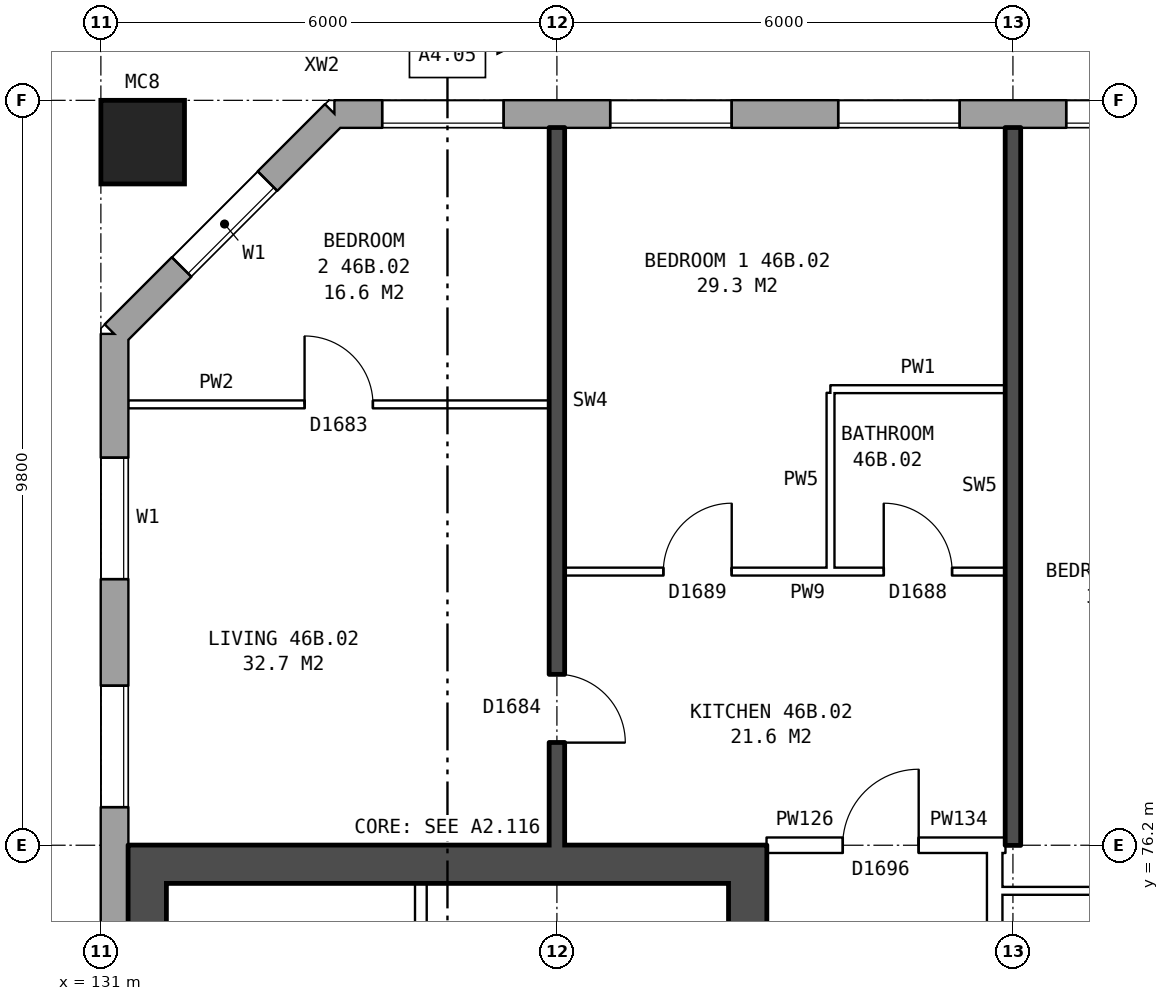
"""IFC4 building model, lengths in metres.
Left out: names, types, materials, properties, quantities, classifications, styles, units other than length and angle.
Written with IfcOpenShell. Run it as: python <this file> out.ifc"""

import sys

from ifc_helpers import new_model, si_unit, direction, frame, frame_2d, origin, origin_2d, place, context, subcontext, project, spatial, rectangle, hollow_rectangle, extrude, element, fill, save


model = new_model("IFC4")
c1 = context("Model", 3, precision=1e-05, world=origin(), true_north=direction((0.0, 1.0)))
c2 = subcontext(c1, "Body", "Model", "MODEL_VIEW")
j1 = project(units=[si_unit("LENGTHUNIT", "METRE"), si_unit("PLANEANGLEUNIT", "RADIAN")], contexts=[c1])
p1 = place(None, origin())
s1 = spatial("IfcSite", under=j1, at=p1, CompositionType="ELEMENT")
p2 = place(p1, origin())
s2 = spatial("IfcBuilding", under=s1, at=p2, CompositionType="ELEMENT")
p3 = place(p2, frame((0.0, 0.0, 164.0)))
s3 = spatial("IfcBuildingStorey", under=s2, at=p3, CompositionType="ELEMENT", Elevation=164.0)
p4 = place(p3, frame((131.55, 85.45, 0.0), z_axis=(0.0, 0.0, 1.0), x_axis=(1.0, 0.0, 0.0)))
e1 = element("IfcColumn", 1, at=p4, inside=s3, PredefinedType="COLUMN", context=c2, shape_type="SweptSolid", body=[
    extrude(hollow_rectangle(XDim=1.1, YDim=1.1, WallThickness=0.06, at=origin_2d()), origin(), (0.0, 0.0, 1.0), 3.1),
])
p5 = place(p3, frame((168.425, 85.82, 0.0), z_axis=(0.0, 0.0, 1.0), x_axis=(-1.0, 0.0, 0.0)))
e2 = element("IfcWall", 2, at=p5, inside=s3, PredefinedType="STANDARD", context=c2, shape_type="SweptSolid", body=[
    extrude(rectangle(XDim=34.351, YDim=0.36, at=frame_2d((17.175, 0.0))), origin(), (0.0, 0.0, 1.0), 2.85),
])
p6 = place(p5, frame((2.125, 0.0, 0.8)))
e3 = element("IfcOpeningElement", 3, at=p6, cuts=e2, PredefinedType="OPENING", context=c2, shape_type="SweptSolid", body=[
    extrude(rectangle(XDim=1.6, YDim=1.8, at=frame_2d((0.8, 0.9))), frame((0.0, 0.19, 0.0), z_axis=(0.0, -1.0, 0.0), x_axis=(1.0, 0.0, 0.0)), (0.0, 0.0, 1.0), 0.38),
])
p7 = place(p5, frame((5.125, 0.0, 0.8)))
e4 = element("IfcOpeningElement", 4, at=p7, cuts=e2, PredefinedType="OPENING", context=c2, shape_type="SweptSolid", body=[
    extrude(rectangle(XDim=1.6, YDim=1.8, at=frame_2d((0.8, 0.9))), frame((0.0, 0.19, 0.0), z_axis=(0.0, -1.0, 0.0), x_axis=(1.0, 0.0, 0.0)), (0.0, 0.0, 1.0), 0.38),
])
p8 = place(p5, frame((8.125, 0.0, 0.8)))
e5 = element("IfcOpeningElement", 5, at=p8, cuts=e2, PredefinedType="OPENING", context=c2, shape_type="SweptSolid", body=[
    extrude(rectangle(XDim=1.6, YDim=1.8, at=frame_2d((0.8, 0.9))), frame((0.0, 0.19, 0.0), z_axis=(0.0, -1.0, 0.0), x_axis=(1.0, 0.0, 0.0)), (0.0, 0.0, 1.0), 0.38),
])
p9 = place(p5, frame((11.125, 0.0, 0.8)))
e6 = element("IfcOpeningElement", 6, at=p9, cuts=e2, PredefinedType="OPENING", context=c2, shape_type="SweptSolid", body=[
    extrude(rectangle(XDim=1.6, YDim=1.8, at=frame_2d((0.8, 0.9))), frame((0.0, 0.19, 0.0), z_axis=(0.0, -1.0, 0.0), x_axis=(1.0, 0.0, 0.0)), (0.0, 0.0, 1.0), 0.38),
])
p10 = place(p5, frame((13.625, 0.0, 0.9)))
e7 = element("IfcOpeningElement", 7, at=p10, cuts=e2, PredefinedType="OPENING", context=c2, shape_type="SweptSolid", body=[
    extrude(rectangle(XDim=1.0, YDim=1.5, at=frame_2d((0.5, 0.75))), frame((0.0, 0.19, 0.0), z_axis=(0.0, -1.0, 0.0), x_axis=(1.0, 0.0, 0.0)), (0.0, 0.0, 1.0), 0.38),
])
p11 = place(p5, frame((16.575, 0.0, 0.25)))
e8 = element("IfcOpeningElement", 8, at=p11, cuts=e2, PredefinedType="OPENING", context=c2, shape_type="SweptSolid", body=[
    extrude(rectangle(XDim=1.4, YDim=1.2, at=frame_2d((0.7, 0.6))), frame((0.0, 0.19, 0.0), z_axis=(0.0, -1.0, 0.0), x_axis=(1.0, 0.0, 0.0)), (0.0, 0.0, 1.0), 0.38),
])
p12 = place(p5, frame((20.125, 0.0, 0.8)))
e9 = element("IfcOpeningElement", 9, at=p12, cuts=e2, PredefinedType="OPENING", context=c2, shape_type="SweptSolid", body=[
    extrude(rectangle(XDim=1.6, YDim=1.8, at=frame_2d((0.8, 0.9))), frame((0.0, 0.19, 0.0), z_axis=(0.0, -1.0, 0.0), x_axis=(1.0, 0.0, 0.0)), (0.0, 0.0, 1.0), 0.38),
])
p13 = place(p5, frame((23.125, 0.0, 0.8)))
e10 = element("IfcOpeningElement", 10, at=p13, cuts=e2, PredefinedType="OPENING", context=c2, shape_type="SweptSolid", body=[
    extrude(rectangle(XDim=1.6, YDim=1.8, at=frame_2d((0.8, 0.9))), frame((0.0, 0.19, 0.0), z_axis=(0.0, -1.0, 0.0), x_axis=(1.0, 0.0, 0.0)), (0.0, 0.0, 1.0), 0.38),
])
p14 = place(p5, frame((26.125, 0.0, 0.8)))
e11 = element("IfcOpeningElement", 11, at=p14, cuts=e2, PredefinedType="OPENING", context=c2, shape_type="SweptSolid", body=[
    extrude(rectangle(XDim=1.6, YDim=1.8, at=frame_2d((0.8, 0.9))), frame((0.0, 0.19, 0.0), z_axis=(0.0, -1.0, 0.0), x_axis=(1.0, 0.0, 0.0)), (0.0, 0.0, 1.0), 0.38),
])
p15 = place(p5, frame((29.125, 0.0, 0.8)))
e12 = element("IfcOpeningElement", 12, at=p15, cuts=e2, PredefinedType="OPENING", context=c2, shape_type="SweptSolid", body=[
    extrude(rectangle(XDim=1.6, YDim=1.8, at=frame_2d((0.8, 0.9))), frame((0.0, 0.19, 0.0), z_axis=(0.0, -1.0, 0.0), x_axis=(1.0, 0.0, 0.0)), (0.0, 0.0, 1.0), 0.38),
])
p16 = place(p5, frame((32.125, 0.0, 0.8)))
e13 = element("IfcOpeningElement", 13, at=p16, cuts=e2, PredefinedType="OPENING", context=c2, shape_type="SweptSolid", body=[
    extrude(rectangle(XDim=1.6, YDim=1.8, at=frame_2d((0.8, 0.9))), frame((0.0, 0.19, 0.0), z_axis=(0.0, -1.0, 0.0), x_axis=(1.0, 0.0, 0.0)), (0.0, 0.0, 1.0), 0.38),
])
p17 = place(p5, frame((14.925, 0.0, 1.7)))
e14 = element("IfcOpeningElement", 14, at=p17, cuts=e2, PredefinedType="OPENING", context=c2, shape_type="SweptSolid", body=[
    extrude(rectangle(XDim=0.6, YDim=0.9, at=frame_2d((0.3, 0.45))), frame((0.0, 0.19, 0.0), z_axis=(0.0, -1.0, 0.0), x_axis=(1.0, 0.0, 0.0)), (0.0, 0.0, 1.0), 0.38),
])
p18 = place(p3, frame((134.075, 85.82, 0.0), z_axis=(0.0, 0.0, 1.0), x_axis=(-0.707106781187, -0.707106781187, 0.0)))
e15 = element("IfcWall", 15, at=p18, inside=s3, PredefinedType="STANDARD", context=c2, shape_type="SweptSolid", body=[
    extrude(rectangle(XDim=4.094, YDim=0.36, at=frame_2d((2.047, 0.0))), origin(), (0.0, 0.0, 1.0), 2.85),
])
p19 = place(p18, frame((1.247, 0.0, 0.8)))
e16 = element("IfcOpeningElement", 16, at=p19, cuts=e15, PredefinedType="OPENING", context=c2, shape_type="SweptSolid", body=[
    extrude(rectangle(XDim=1.6, YDim=1.8, at=frame_2d((0.8, 0.9))), frame((0.0, 0.19, 0.0), z_axis=(0.0, -1.0, 0.0), x_axis=(1.0, 0.0, 0.0)), (0.0, 0.0, 1.0), 0.38),
])
p20 = place(p3, frame((131.18, 82.925, 0.0), z_axis=(0.0, 0.0, 1.0), x_axis=(0.0, -1.0, 0.0)))
e17 = element("IfcWall", 17, at=p20, inside=s3, PredefinedType="STANDARD", context=c2, shape_type="SweptSolid", body=[
    extrude(rectangle(XDim=25.851, YDim=0.36, at=frame_2d((12.925, 0.0))), origin(), (0.0, 0.0, 1.0), 2.85),
])
p21 = place(p20, frame((1.625, 0.0, 0.8)))
e18 = element("IfcOpeningElement", 18, at=p21, cuts=e17, PredefinedType="OPENING", context=c2, shape_type="SweptSolid", body=[
    extrude(rectangle(XDim=1.6, YDim=1.8, at=frame_2d((0.8, 0.9))), frame((0.0, 0.19, 0.0), z_axis=(0.0, -1.0, 0.0), x_axis=(1.0, 0.0, 0.0)), (0.0, 0.0, 1.0), 0.38),
])
p22 = place(p20, frame((4.625, 0.0, 0.8)))
e19 = element("IfcOpeningElement", 19, at=p22, cuts=e17, PredefinedType="OPENING", context=c2, shape_type="SweptSolid", body=[
    extrude(rectangle(XDim=1.6, YDim=1.8, at=frame_2d((0.8, 0.9))), frame((0.0, 0.19, 0.0), z_axis=(0.0, -1.0, 0.0), x_axis=(1.0, 0.0, 0.0)), (0.0, 0.0, 1.0), 0.38),
])
p23 = place(p20, frame((19.625, 0.0, 0.8)))
e20 = element("IfcOpeningElement", 20, at=p23, cuts=e17, PredefinedType="OPENING", context=c2, shape_type="SweptSolid", body=[
    extrude(rectangle(XDim=1.6, YDim=1.8, at=frame_2d((0.8, 0.9))), frame((0.0, 0.19, 0.0), z_axis=(0.0, -1.0, 0.0), x_axis=(1.0, 0.0, 0.0)), (0.0, 0.0, 1.0), 0.38),
])
p24 = place(p20, frame((22.625, 0.0, 0.8)))
e21 = element("IfcOpeningElement", 21, at=p24, cuts=e17, PredefinedType="OPENING", context=c2, shape_type="SweptSolid", body=[
    extrude(rectangle(XDim=1.6, YDim=1.8, at=frame_2d((0.8, 0.9))), frame((0.0, 0.19, 0.0), z_axis=(0.0, -1.0, 0.0), x_axis=(1.0, 0.0, 0.0)), (0.0, 0.0, 1.0), 0.38),
])
p25 = place(p3, frame((139.51, 63.8, 0.0), z_axis=(0.0, 0.0, 1.0), x_axis=(0.0, 1.0, 0.0)))
e22 = element("IfcWall", 22, at=p25, inside=s3, PredefinedType="SHEAR", context=c2, shape_type="SweptSolid", body=[
    extrude(rectangle(XDim=12.4, YDim=0.5, at=frame_2d((6.2, 0.0))), origin(), (0.0, 0.0, 1.0), 2.85),
])
p26 = place(p25, frame((1.325, 0.0, 0.0)))
e23 = element("IfcOpeningElement", 23, at=p26, cuts=e22, PredefinedType="OPENING", context=c2, shape_type="SweptSolid", body=[
    extrude(rectangle(XDim=1.1, YDim=2.1, at=frame_2d((0.55, 1.05))), frame((0.0, 0.26, 0.0), z_axis=(0.0, -1.0, 0.0), x_axis=(1.0, 0.0, 0.0)), (0.0, 0.0, 1.0), 0.52),
])
p27 = place(p25, frame((3.6, 0.0, 0.0)))
e24 = element("IfcOpeningElement", 24, at=p27, cuts=e22, PredefinedType="OPENING", context=c2, shape_type="SweptSolid", body=[
    extrude(rectangle(XDim=1.1, YDim=2.1, at=frame_2d((0.55, 1.05))), frame((0.0, 0.26, 0.0), z_axis=(0.0, -1.0, 0.0), x_axis=(1.0, 0.0, 0.0)), (0.0, 0.0, 1.0), 0.52),
])
p28 = place(p25, frame((5.8, 0.0, 0.0)))
e25 = element("IfcOpeningElement", 25, at=p28, cuts=e22, PredefinedType="OPENING", context=c2, shape_type="SweptSolid", body=[
    extrude(rectangle(XDim=1.1, YDim=2.1, at=frame_2d((0.55, 1.05))), frame((0.0, 0.26, 0.0), z_axis=(0.0, -1.0, 0.0), x_axis=(1.0, 0.0, 0.0)), (0.0, 0.0, 1.0), 0.52),
])
p29 = place(p25, frame((9.9, 0.0, 0.0)))
e26 = element("IfcOpeningElement", 26, at=p29, cuts=e22, PredefinedType="OPENING", context=c2, shape_type="SweptSolid", body=[
    extrude(rectangle(XDim=1.1, YDim=2.1, at=frame_2d((0.55, 1.05))), frame((0.0, 0.26, 0.0), z_axis=(0.0, -1.0, 0.0), x_axis=(1.0, 0.0, 0.0)), (0.0, 0.0, 1.0), 0.52),
])
p30 = place(p25, frame((8.125, 0.0, 0.0)))
e27 = element("IfcOpeningElement", 27, at=p30, cuts=e22, PredefinedType="OPENING", context=c2, shape_type="SweptSolid", body=[
    extrude(rectangle(XDim=0.85, YDim=2.1, at=frame_2d((0.425, 1.05))), frame((0.0, 0.26, 0.0), z_axis=(0.0, -1.0, 0.0), x_axis=(1.0, 0.0, 0.0)), (0.0, 0.0, 1.0), 0.52),
])
p31 = place(p3, frame((131.61, 63.8, 0.0), z_axis=(0.0, 0.0, 1.0), x_axis=(0.0, 1.0, 0.0)))
e28 = element("IfcWall", 28, at=p31, inside=s3, PredefinedType="SHEAR", context=c2, shape_type="SweptSolid", body=[
    extrude(rectangle(XDim=12.4, YDim=0.5, at=frame_2d((6.2, 0.0))), origin(), (0.0, 0.0, 1.0), 2.85),
])
p32 = place(p3, frame((139.26, 75.95, 0.0), z_axis=(0.0, 0.0, 1.0), x_axis=(-1.0, 0.0, 0.0)))
e29 = element("IfcWall", 29, at=p32, inside=s3, PredefinedType="SHEAR", context=c2, shape_type="SweptSolid", body=[
    extrude(rectangle(XDim=7.4, YDim=0.5, at=frame_2d((3.7, 0.0))), origin(), (0.0, 0.0, 1.0), 2.85),
])
p33 = place(p3, frame((135.21, 71.375, 0.0), z_axis=(0.0, 0.0, 1.0), x_axis=(0.0, 1.0, 0.0)))
e30 = element("IfcWall", 30, at=p33, inside=s3, PredefinedType="PARTITIONING", context=c2, shape_type="SweptSolid", body=[
    extrude(rectangle(XDim=4.325, YDim=0.15, at=frame_2d((2.163, 0.0))), origin(), (0.0, 0.0, 1.0), 2.85),
])
p34 = place(p33, frame((2.65, 0.0, 0.0)))
e31 = element("IfcOpeningElement", 31, at=p34, cuts=e30, PredefinedType="OPENING", context=c2, shape_type="SweptSolid", body=[
    extrude(rectangle(XDim=1.1, YDim=2.1, at=frame_2d((0.55, 1.05))), frame((0.0, 0.085, 0.0), z_axis=(0.0, -1.0, 0.0), x_axis=(1.0, 0.0, 0.0)), (0.0, 0.0, 1.0), 0.17),
])
p35 = place(p3, frame((142.76, 63.9, 0.0), z_axis=(0.0, 0.0, 1.0), x_axis=(0.0, 1.0, 0.0)))
e32 = element("IfcWall", 32, at=p35, inside=s3, PredefinedType="PARTITIONING", context=c2, shape_type="SweptSolid", body=[
    extrude(rectangle(XDim=12.2, YDim=0.2, at=frame_2d((6.1, 0.0))), origin(), (0.0, 0.0, 1.0), 2.85),
])
p36 = place(p35, frame((5.1, 0.0, 0.0)))
e33 = element("IfcOpeningElement", 33, at=p36, cuts=e32, PredefinedType="OPENING", context=c2, shape_type="SweptSolid", body=[
    extrude(rectangle(XDim=2.0, YDim=2.1, at=frame_2d((1.0, 1.05))), frame((0.0, 0.11, 0.0), z_axis=(0.0, -1.0, 0.0), x_axis=(1.0, 0.0, 0.0)), (0.0, 0.0, 1.0), 0.22),
])
p37 = place(p3, frame((142.76, 75.6, 0.0), z_axis=(0.0, 0.0, 1.0), x_axis=(1.0, 0.0, 0.0)))
e34 = element("IfcWall", 34, at=p37, inside=s3, PredefinedType="PARTITIONING", context=c2, shape_type="SweptSolid", body=[
    extrude(rectangle(XDim=3.24, YDim=0.1, at=frame_2d((1.62, 0.0))), origin(), (0.0, 0.0, 1.0), 2.85),
])
p38 = place(p3, frame((139.76, 76.2, 0.0), z_axis=(0.0, 0.0, 1.0), x_axis=(1.0, 0.0, 0.0)))
e35 = element("IfcWall", 35, at=p38, inside=s3, PredefinedType="PARTITIONING", context=c2, shape_type="SweptSolid", body=[
    extrude(rectangle(XDim=3.0, YDim=0.2, at=frame_2d((1.5, 0.0))), origin(), (0.0, 0.0, 1.0), 2.85),
])
p39 = place(p38, frame((1.0, 0.0, 0.0)))
e36 = element("IfcOpeningElement", 36, at=p39, cuts=e35, PredefinedType="OPENING", context=c2, shape_type="SweptSolid", body=[
    extrude(rectangle(XDim=1.0, YDim=2.1, at=frame_2d((0.5, 1.05))), frame((0.0, 0.11, 0.0), z_axis=(0.0, -1.0, 0.0), x_axis=(1.0, 0.0, 0.0)), (0.0, 0.0, 1.0), 0.22),
])
p40 = place(p3, frame((142.76, 76.2, 0.0), z_axis=(0.0, 0.0, 1.0), x_axis=(1.0, 0.0, 0.0)))
e37 = element("IfcWall", 37, at=p40, inside=s3, PredefinedType="PARTITIONING", context=c2, shape_type="SweptSolid", body=[
    extrude(rectangle(XDim=0.14, YDim=0.2, at=frame_2d((0.07, 0.0))), origin(), (0.0, 0.0, 1.0), 2.85),
])
p41 = place(p3, frame((137.1, 79.8, 0.0), z_axis=(0.0, 0.0, 1.0), x_axis=(1.0, 0.0, 0.0)))
e38 = element("IfcWall", 38, at=p41, inside=s3, PredefinedType="PARTITIONING", context=c2, shape_type="SweptSolid", body=[
    extrude(rectangle(XDim=5.8, YDim=0.1, at=frame_2d((2.9, 0.0))), origin(), (0.0, 0.0, 1.0), 2.85),
])
p42 = place(p41, frame((1.3, 0.0, 0.0)))
e39 = element("IfcOpeningElement", 39, at=p42, cuts=e38, PredefinedType="OPENING", context=c2, shape_type="SweptSolid", body=[
    extrude(rectangle(XDim=0.9, YDim=2.1, at=frame_2d((0.45, 1.05))), frame((0.0, 0.06, 0.0), z_axis=(0.0, -1.0, 0.0), x_axis=(1.0, 0.0, 0.0)), (0.0, 0.0, 1.0), 0.12),
])
p43 = place(p41, frame((4.2, 0.0, 0.0)))
e40 = element("IfcOpeningElement", 40, at=p43, cuts=e38, PredefinedType="OPENING", context=c2, shape_type="SweptSolid", body=[
    extrude(rectangle(XDim=0.9, YDim=2.1, at=frame_2d((0.45, 1.05))), frame((0.0, 0.06, 0.0), z_axis=(0.0, -1.0, 0.0), x_axis=(1.0, 0.0, 0.0)), (0.0, 0.0, 1.0), 0.12),
])
p44 = place(p3, frame((131.36, 82.0, 0.0), z_axis=(0.0, 0.0, 1.0), x_axis=(1.0, 0.0, 0.0)))
e41 = element("IfcWall", 41, at=p44, inside=s3, PredefinedType="PARTITIONING", context=c2, shape_type="SweptSolid", body=[
    extrude(rectangle(XDim=5.54, YDim=0.1, at=frame_2d((2.77, 0.0))), origin(), (0.0, 0.0, 1.0), 2.85),
])
p45 = place(p44, frame((2.32, 0.0, 0.0)))
e42 = element("IfcOpeningElement", 42, at=p45, cuts=e41, PredefinedType="OPENING", context=c2, shape_type="SweptSolid", body=[
    extrude(rectangle(XDim=0.9, YDim=2.1, at=frame_2d((0.45, 1.05))), frame((0.0, 0.06, 0.0), z_axis=(0.0, -1.0, 0.0), x_axis=(1.0, 0.0, 0.0)), (0.0, 0.0, 1.0), 0.12),
])
p46 = place(p3, frame((140.6, 82.2, 0.0), z_axis=(0.0, 0.0, 1.0), x_axis=(1.0, 0.0, 0.0)))
e43 = element("IfcWall", 43, at=p46, inside=s3, PredefinedType="PARTITIONING", context=c2, shape_type="SweptSolid", body=[
    extrude(rectangle(XDim=2.3, YDim=0.1, at=frame_2d((1.15, 0.0))), origin(), (0.0, 0.0, 1.0), 2.85),
])
p47 = place(p3, frame((137.0, 76.2, 0.0), z_axis=(0.0, 0.0, 1.0), x_axis=(0.0, 1.0, 0.0)))
e44 = element("IfcWall", 44, at=p47, inside=s3, PredefinedType="SOLIDWALL", context=c2, shape_type="SweptSolid", body=[
    extrude(rectangle(XDim=9.44, YDim=0.2, at=frame_2d((4.72, 0.0))), origin(), (0.0, 0.0, 1.0), 2.85),
])
p48 = place(p47, frame((1.35, 0.0, 0.0)))
e45 = element("IfcOpeningElement", 45, at=p48, cuts=e44, PredefinedType="OPENING", context=c2, shape_type="SweptSolid", body=[
    extrude(rectangle(XDim=0.9, YDim=2.1, at=frame_2d((0.45, 1.05))), frame((0.0, 0.11, 0.0), z_axis=(0.0, -1.0, 0.0), x_axis=(1.0, 0.0, 0.0)), (0.0, 0.0, 1.0), 0.22),
])
p49 = place(p3, frame((140.6, 79.85, 0.0), z_axis=(0.0, 0.0, 1.0), x_axis=(0.0, 1.0, 0.0)))
e46 = element("IfcWall", 46, at=p49, inside=s3, PredefinedType="PARTITIONING", context=c2, shape_type="SweptSolid", body=[
    extrude(rectangle(XDim=2.3, YDim=0.1, at=frame_2d((1.15, 0.0))), origin(), (0.0, 0.0, 1.0), 2.85),
])
p50 = place(p3, frame((143.0, 76.2, 0.0), z_axis=(0.0, 0.0, 1.0), x_axis=(0.0, 1.0, 0.0)))
e47 = element("IfcWall", 47, at=p50, inside=s3, PredefinedType="SOLIDWALL", context=c2, shape_type="SweptSolid", body=[
    extrude(rectangle(XDim=9.44, YDim=0.2, at=frame_2d((4.72, 0.0))), origin(), (0.0, 0.0, 1.0), 2.85),
])
p51 = place(p13, origin())
e48 = element("IfcWindow", 48, at=p51, inside=s3, PartitioningType="SINGLE_PANEL", PredefinedType="WINDOW", context=c2, shape_type="SweptSolid", body=[
    extrude(rectangle(XDim=1.6, YDim=1.8, at=frame_2d((0.8, 0.9))), frame((0.0, 0.15, 0.0), z_axis=(0.0, -1.0, 0.0), x_axis=(1.0, 0.0, 0.0)), (0.0, 0.0, 1.0), 0.06),
])
fill(e10, e48)
p52 = place(p14, origin())
e49 = element("IfcWindow", 49, at=p52, inside=s3, PartitioningType="SINGLE_PANEL", PredefinedType="WINDOW", context=c2, shape_type="SweptSolid", body=[
    extrude(rectangle(XDim=1.6, YDim=1.8, at=frame_2d((0.8, 0.9))), frame((0.0, 0.15, 0.0), z_axis=(0.0, -1.0, 0.0), x_axis=(1.0, 0.0, 0.0)), (0.0, 0.0, 1.0), 0.06),
])
fill(e11, e49)
p53 = place(p15, origin())
e50 = element("IfcWindow", 50, at=p53, inside=s3, PartitioningType="SINGLE_PANEL", PredefinedType="WINDOW", context=c2, shape_type="SweptSolid", body=[
    extrude(rectangle(XDim=1.6, YDim=1.8, at=frame_2d((0.8, 0.9))), frame((0.0, 0.15, 0.0), z_axis=(0.0, -1.0, 0.0), x_axis=(1.0, 0.0, 0.0)), (0.0, 0.0, 1.0), 0.06),
])
fill(e12, e50)
p54 = place(p16, origin())
e51 = element("IfcWindow", 51, at=p54, inside=s3, PartitioningType="SINGLE_PANEL", PredefinedType="WINDOW", context=c2, shape_type="SweptSolid", body=[
    extrude(rectangle(XDim=1.6, YDim=1.8, at=frame_2d((0.8, 0.9))), frame((0.0, 0.15, 0.0), z_axis=(0.0, -1.0, 0.0), x_axis=(1.0, 0.0, 0.0)), (0.0, 0.0, 1.0), 0.06),
])
fill(e13, e51)
p55 = place(p19, origin())
e52 = element("IfcWindow", 52, at=p55, inside=s3, PartitioningType="SINGLE_PANEL", PredefinedType="WINDOW", context=c2, shape_type="SweptSolid", body=[
    extrude(rectangle(XDim=1.6, YDim=1.8, at=frame_2d((0.8, 0.9))), frame((0.0, 0.15, 0.0), z_axis=(0.0, -1.0, 0.0), x_axis=(1.0, 0.0, 0.0)), (0.0, 0.0, 1.0), 0.06),
])
fill(e16, e52)
p56 = place(p21, origin())
e53 = element("IfcWindow", 53, at=p56, inside=s3, PartitioningType="SINGLE_PANEL", PredefinedType="WINDOW", context=c2, shape_type="SweptSolid", body=[
    extrude(rectangle(XDim=1.6, YDim=1.8, at=frame_2d((0.8, 0.9))), frame((0.0, 0.15, 0.0), z_axis=(0.0, -1.0, 0.0), x_axis=(1.0, 0.0, 0.0)), (0.0, 0.0, 1.0), 0.06),
])
fill(e18, e53)
p57 = place(p22, origin())
e54 = element("IfcWindow", 54, at=p57, inside=s3, PartitioningType="SINGLE_PANEL", PredefinedType="WINDOW", context=c2, shape_type="SweptSolid", body=[
    extrude(rectangle(XDim=1.6, YDim=1.8, at=frame_2d((0.8, 0.9))), frame((0.0, 0.15, 0.0), z_axis=(0.0, -1.0, 0.0), x_axis=(1.0, 0.0, 0.0)), (0.0, 0.0, 1.0), 0.06),
])
fill(e19, e54)
p58 = place(p42, origin())
e55 = element("IfcDoor", 55, at=p58, inside=s3, OperationType="SINGLE_SWING_RIGHT", PredefinedType="DOOR", context=c2, shape_type="SweptSolid", body=[
    extrude(rectangle(XDim=0.9, YDim=2.1, at=frame_2d((0.45, 1.05))), frame((0.0, 0.025, 0.0), z_axis=(0.0, -1.0, 0.0), x_axis=(1.0, 0.0, 0.0)), (0.0, 0.0, 1.0), 0.05),
])
fill(e39, e55)
p59 = place(p45, origin())
e56 = element("IfcDoor", 56, at=p59, inside=s3, OperationType="SINGLE_SWING_LEFT", PredefinedType="DOOR", context=c2, shape_type="SweptSolid", body=[
    extrude(rectangle(XDim=0.9, YDim=2.1, at=frame_2d((0.45, 1.05))), frame((0.0, 0.025, 0.0), z_axis=(0.0, -1.0, 0.0), x_axis=(1.0, 0.0, 0.0)), (0.0, 0.0, 1.0), 0.05),
])
fill(e42, e56)
p60 = place(p39, origin())
e57 = element("IfcDoor", 57, at=p60, inside=s3, OperationType="SINGLE_SWING_RIGHT", PredefinedType="DOOR", context=c2, shape_type="SweptSolid", body=[
    extrude(rectangle(XDim=1.0, YDim=2.1, at=frame_2d((0.5, 1.05))), frame((0.0, 0.025, 0.0), z_axis=(0.0, -1.0, 0.0), x_axis=(1.0, 0.0, 0.0)), (0.0, 0.0, 1.0), 0.05),
])
fill(e36, e57)
p61 = place(p48, frame((0.9, 0.0, 0.0), z_axis=(0.0, 0.0, 1.0), x_axis=(-1.0, 0.0, 0.0)))
e58 = element("IfcDoor", 58, at=p61, inside=s3, OperationType="SINGLE_SWING_RIGHT", PredefinedType="DOOR", context=c2, shape_type="SweptSolid", body=[
    extrude(rectangle(XDim=0.9, YDim=2.1, at=frame_2d((0.45, 1.05))), frame((0.0, 0.025, 0.0), z_axis=(0.0, -1.0, 0.0), x_axis=(1.0, 0.0, 0.0)), (0.0, 0.0, 1.0), 0.05),
])
fill(e45, e58)
p62 = place(p43, origin())
e59 = element("IfcDoor", 59, at=p62, inside=s3, OperationType="SINGLE_SWING_LEFT", PredefinedType="DOOR", context=c2, shape_type="SweptSolid", body=[
    extrude(rectangle(XDim=0.9, YDim=2.1, at=frame_2d((0.45, 1.05))), frame((0.0, 0.025, 0.0), z_axis=(0.0, -1.0, 0.0), x_axis=(1.0, 0.0, 0.0)), (0.0, 0.0, 1.0), 0.05),
])
fill(e40, e59)
save(model, sys.argv[1])
